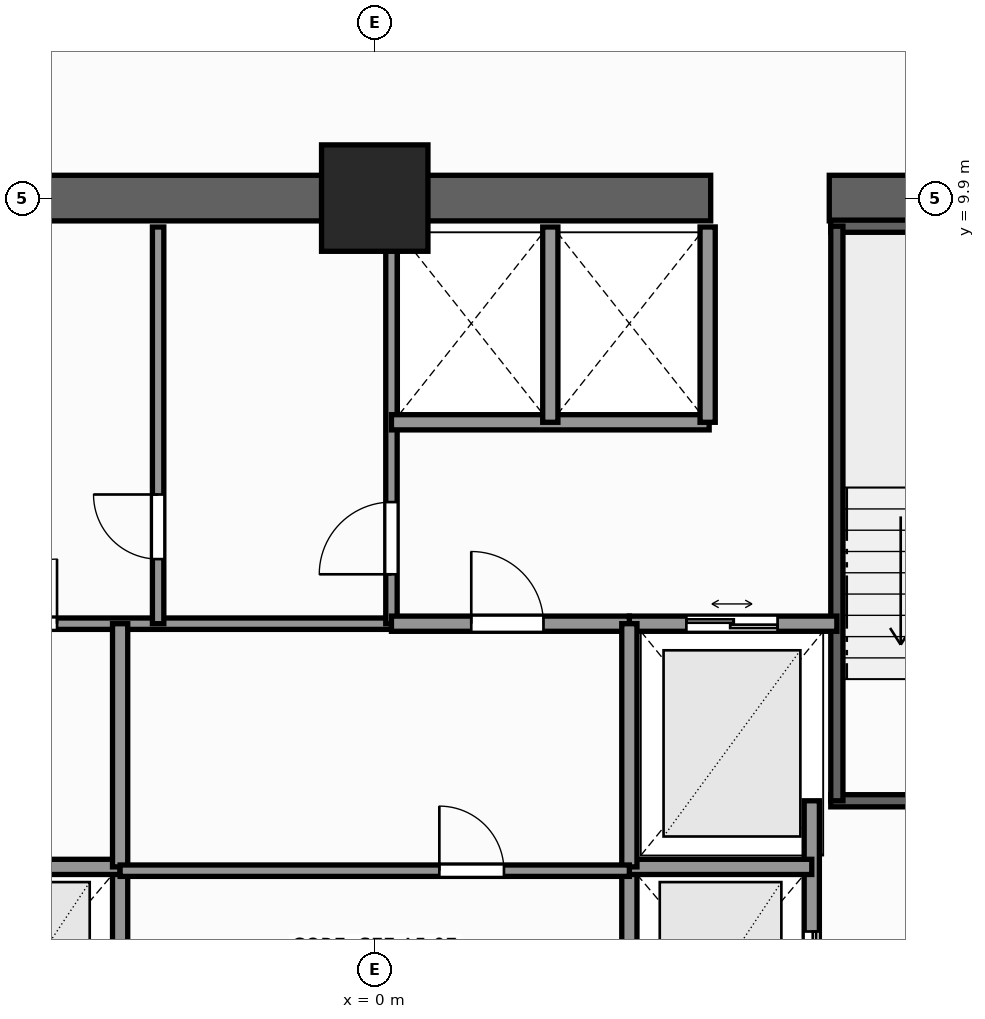
"""IFC4 building model, lengths in metres.
Left out: names, types, materials, properties, quantities, classifications, styles, units other than length and angle.
Written with IfcOpenShell. Run it as: python <this file> out.ifc"""

import sys

from ifc_helpers import new_model, si_unit, direction, frame, frame_2d, origin, origin_2d, place, context, subcontext, project, spatial, rectangle, extrude, element, fill, save


model = new_model("IFC4")
c1 = context("Model", 3, precision=1e-05, world=origin(), true_north=direction((0.0, 1.0)))
c2 = subcontext(c1, "Body", "Model", "MODEL_VIEW")
j1 = project(units=[si_unit("LENGTHUNIT", "METRE"), si_unit("PLANEANGLEUNIT", "RADIAN")], contexts=[c1])
p1 = place(None, origin())
s1 = spatial("IfcSite", under=j1, at=p1, CompositionType="ELEMENT")
p2 = place(p1, origin())
s2 = spatial("IfcBuilding", under=s1, at=p2, CompositionType="ELEMENT")
p3 = place(p2, frame((0.0, 0.0, 88.7)))
s3 = spatial("IfcBuildingStorey", under=s2, at=p3, CompositionType="ELEMENT", Elevation=88.7)
p4 = place(p3, frame((-10.2, 9.9, 0.0), z_axis=(0.0, 0.0, 1.0), x_axis=(1.0, 0.0, 0.0)))
e1 = element("IfcWall", 1, at=p4, inside=s3, PredefinedType="SHEAR", context=c2, shape_type="SweptSolid", body=[
    extrude(rectangle(XDim=14.62, YDim=0.6, at=frame_2d((7.31, 0.0))), origin(), (0.0, 0.0, 1.0), 3.3),
])
p5 = place(p3, frame((5.98, 9.9, 0.0), z_axis=(0.0, 0.0, 1.0), x_axis=(1.0, 0.0, 0.0)))
e2 = element("IfcWall", 2, at=p5, inside=s3, PredefinedType="SHEAR", context=c2, shape_type="SweptSolid", body=[
    extrude(rectangle(XDim=4.22, YDim=0.6, at=frame_2d((2.11, 0.0))), origin(), (0.0, 0.0, 1.0), 3.3),
])
p6 = place(p3, frame((0.0, 9.9, 0.0), z_axis=(0.0, 0.0, 1.0), x_axis=(1.0, 0.0, 0.0)))
e3 = element("IfcColumn", 3, at=p6, inside=s3, PredefinedType="COLUMN", context=c2, shape_type="SweptSolid", body=[
    extrude(rectangle(XDim=1.4, YDim=1.4, at=origin_2d()), origin(), (0.0, 0.0, 1.0), 3.3),
])
p7 = place(p3, frame((6.0, 1.97, 0.0), z_axis=(0.0, 0.0, 1.0), x_axis=(1.0, 0.0, 0.0)))
e4 = element("IfcWall", 4, at=p7, inside=s3, PredefinedType="SHEAR", context=c2, shape_type="SweptSolid", body=[
    extrude(rectangle(XDim=3.52, YDim=0.16, at=frame_2d((1.76, 0.0))), origin(), (0.0, 0.0, 1.0), 3.3),
])
p8 = place(p7, frame((1.15, 0.0, 0.0)))
e5 = element("IfcOpeningElement", 5, at=p8, cuts=e4, PredefinedType="OPENING", context=c2, shape_type="SweptSolid", body=[
    extrude(rectangle(XDim=1.1, YDim=2.2, at=frame_2d((0.55, 1.1))), frame((0.0, 0.09, 0.0), z_axis=(0.0, -1.0, 0.0), x_axis=(1.0, 0.0, 0.0)), (0.0, 0.0, 1.0), 0.18),
])
p9 = place(p3, frame((6.0, 9.53, 0.0), z_axis=(0.0, 0.0, 1.0), x_axis=(1.0, 0.0, 0.0)))
e6 = element("IfcWall", 6, at=p9, inside=s3, PredefinedType="SHEAR", context=c2, shape_type="SweptSolid", body=[
    extrude(rectangle(XDim=3.52, YDim=0.16, at=frame_2d((1.76, 0.0))), origin(), (0.0, 0.0, 1.0), 3.3),
])
p10 = place(p3, frame((6.08, 1.97, 0.0), z_axis=(0.0, 0.0, 1.0), x_axis=(0.0, 1.0, 0.0)))
e7 = element("IfcWall", 7, at=p10, inside=s3, PredefinedType="SHEAR", context=c2, shape_type="SweptSolid", body=[
    extrude(rectangle(XDim=7.56, YDim=0.16, at=frame_2d((3.78, 0.0))), origin(), (0.0, 0.0, 1.0), 3.3),
])
p11 = place(p3, frame((-3.35, -1.7, 0.0), z_axis=(0.0, 0.0, 1.0), x_axis=(0.0, 1.0, 0.0)))
e8 = element("IfcWall", 8, at=p11, inside=s3, PredefinedType="SOLIDWALL", context=c2, shape_type="SweptSolid", body=[
    extrude(rectangle(XDim=2.8, YDim=0.2, at=frame_2d((1.4, 0.0))), origin(), (0.0, 0.0, 1.0), 3.08),
])
p12 = place(p3, frame((-5.75, 1.1, 0.0), z_axis=(0.0, 0.0, 1.0), x_axis=(1.0, 0.0, 0.0)))
e9 = element("IfcWall", 9, at=p12, inside=s3, PredefinedType="SOLIDWALL", context=c2, shape_type="SweptSolid", body=[
    extrude(rectangle(XDim=2.4, YDim=0.2, at=frame_2d((1.2, 0.0))), origin(), (0.0, 0.0, 1.0), 3.08),
])
p13 = place(p3, frame((5.75, -3.6, 0.0), z_axis=(0.0, 0.0, 1.0), x_axis=(0.0, 1.0, 0.0)))
e10 = element("IfcWall", 10, at=p13, inside=s3, PredefinedType="SOLIDWALL", context=c2, shape_type="SweptSolid", body=[
    extrude(rectangle(XDim=5.57, YDim=0.2, at=frame_2d((2.785, 0.0))), origin(), (0.0, 0.0, 1.0), 3.08),
])
p14 = place(p13, frame((2.75, 0.0, 0.0)))
e11 = element("IfcOpeningElement", 11, at=p14, cuts=e10, PredefinedType="OPENING", context=c2, shape_type="SweptSolid", body=[
    extrude(rectangle(XDim=1.1, YDim=2.2, at=frame_2d((0.55, 1.1))), frame((0.0, 0.11, 0.0), z_axis=(0.0, -1.0, 0.0), x_axis=(1.0, 0.0, 0.0)), (0.0, 0.0, 1.0), 0.22),
])
p15 = place(p3, frame((3.35, -1.7, 0.0), z_axis=(0.0, 0.0, 1.0), x_axis=(0.0, 1.0, 0.0)))
e12 = element("IfcWall", 12, at=p15, inside=s3, PredefinedType="SOLIDWALL", context=c2, shape_type="SweptSolid", body=[
    extrude(rectangle(XDim=2.8, YDim=0.2, at=frame_2d((1.4, 0.0))), origin(), (0.0, 0.0, 1.0), 3.08),
])
p16 = place(p3, frame((3.35, 1.1, 0.0), z_axis=(0.0, 0.0, 1.0), x_axis=(1.0, 0.0, 0.0)))
e13 = element("IfcWall", 13, at=p16, inside=s3, PredefinedType="SOLIDWALL", context=c2, shape_type="SweptSolid", body=[
    extrude(rectangle(XDim=2.4, YDim=0.2, at=frame_2d((1.2, 0.0))), origin(), (0.0, 0.0, 1.0), 3.08),
])
p17 = place(p3, frame((3.35, 4.3, 0.0), z_axis=(0.0, 0.0, 1.0), x_axis=(1.0, 0.0, 0.0)))
e14 = element("IfcWall", 14, at=p17, inside=s3, PredefinedType="SOLIDWALL", context=c2, shape_type="SweptSolid", body=[
    extrude(rectangle(XDim=2.73, YDim=0.2, at=frame_2d((1.365, 0.0))), origin(), (0.0, 0.0, 1.0), 3.08),
])
p18 = place(p17, frame((0.75, 0.0, 0.0)))
e15 = element("IfcOpeningElement", 15, at=p18, cuts=e14, PredefinedType="OPENING", context=c2, shape_type="SweptSolid", body=[
    extrude(rectangle(XDim=1.2, YDim=2.25, at=frame_2d((0.6, 1.125))), frame((0.0, 0.11, 0.0), z_axis=(0.0, -1.0, 0.0), x_axis=(1.0, 0.0, 0.0)), (0.0, 0.0, 1.0), 0.22),
])
p19 = place(p3, frame((-6.08, 4.3, 0.0), z_axis=(0.0, 0.0, 1.0), x_axis=(1.0, 0.0, 0.0)))
e16 = element("IfcWall", 16, at=p19, inside=s3, PredefinedType="PARTITIONING", context=c2, shape_type="SweptSolid", body=[
    extrude(rectangle(XDim=6.3, YDim=0.15, at=frame_2d((3.15, 0.0))), origin(), (0.0, 0.0, 1.0), 3.08),
])
p20 = place(p19, frame((1.05, 0.0, 0.0)))
e17 = element("IfcOpeningElement", 17, at=p20, cuts=e16, PredefinedType="OPENING", context=c2, shape_type="SweptSolid", body=[
    extrude(rectangle(XDim=0.85, YDim=2.03, at=frame_2d((0.425, 1.015))), frame((0.0, 0.085, 0.0), z_axis=(0.0, -1.0, 0.0), x_axis=(1.0, 0.0, 0.0)), (0.0, 0.0, 1.0), 0.17),
])
p21 = place(p3, frame((0.22, 4.3, 0.0), z_axis=(0.0, 0.0, 1.0), x_axis=(0.0, 1.0, 0.0)))
e18 = element("IfcWall", 18, at=p21, inside=s3, PredefinedType="PARTITIONING", context=c2, shape_type="SweptSolid", body=[
    extrude(rectangle(XDim=5.22, YDim=0.15, at=frame_2d((2.61, 0.0))), origin(), (0.0, 0.0, 1.0), 3.08),
])
p22 = place(p21, frame((0.65, 0.0, 0.0)))
e19 = element("IfcOpeningElement", 19, at=p22, cuts=e18, PredefinedType="OPENING", context=c2, shape_type="SweptSolid", body=[
    extrude(rectangle(XDim=0.95, YDim=2.06, at=frame_2d((0.475, 1.03))), frame((0.0, 0.085, 0.0), z_axis=(0.0, -1.0, 0.0), x_axis=(1.0, 0.0, 0.0)), (0.0, 0.0, 1.0), 0.17),
])
p23 = place(p3, frame((-2.85, 4.3, 0.0), z_axis=(0.0, 0.0, 1.0), x_axis=(0.0, 1.0, 0.0)))
e20 = element("IfcWall", 20, at=p23, inside=s3, PredefinedType="PARTITIONING", context=c2, shape_type="SweptSolid", body=[
    extrude(rectangle(XDim=5.22, YDim=0.15, at=frame_2d((2.61, 0.0))), origin(), (0.0, 0.0, 1.0), 3.08),
])
p24 = place(p23, frame((0.85, 0.0, 0.0)))
e21 = element("IfcOpeningElement", 21, at=p24, cuts=e20, PredefinedType="OPENING", context=c2, shape_type="SweptSolid", body=[
    extrude(rectangle(XDim=0.85, YDim=2.03, at=frame_2d((0.425, 1.015))), frame((0.0, 0.085, 0.0), z_axis=(0.0, -1.0, 0.0), x_axis=(1.0, 0.0, 0.0)), (0.0, 0.0, 1.0), 0.17),
])
p25 = place(p3, frame((0.22, 6.95, 0.0), z_axis=(0.0, 0.0, 1.0), x_axis=(1.0, 0.0, 0.0)))
e22 = element("IfcWall", 22, at=p25, inside=s3, PredefinedType="SOLIDWALL", context=c2, shape_type="SweptSolid", body=[
    extrude(rectangle(XDim=4.18, YDim=0.2, at=frame_2d((2.09, 0.0))), origin(), (0.0, 0.0, 1.0), 3.08),
])
for number, where, z_axis, x_axis in (
    (23, (4.38, 6.95, 0.0), (0.0, 0.0, 1.0), (0.0, 1.0, 0.0)),
    (24, (2.31, 6.95, 0.0), (0.0, 0.0, 1.0), (0.0, 1.0, 0.0)),
):
    element("IfcWall", number, at=place(p3, frame(where, z_axis=z_axis, x_axis=x_axis)), inside=s3, PredefinedType="SOLIDWALL", context=c2, shape_type="SweptSolid", body=[
        extrude(rectangle(XDim=2.57, YDim=0.2, at=frame_2d((1.285, 0.0))), origin(), (0.0, 0.0, 1.0), 3.08),
    ])
p26 = place(p3, frame((0.22, 4.3, 0.0), z_axis=(0.0, 0.0, 1.0), x_axis=(1.0, 0.0, 0.0)))
e25 = element("IfcWall", 25, at=p26, inside=s3, PredefinedType="SOLIDWALL", context=c2, shape_type="SweptSolid", body=[
    extrude(rectangle(XDim=3.13, YDim=0.2, at=frame_2d((1.565, 0.0))), origin(), (0.0, 0.0, 1.0), 3.08),
])
p27 = place(p26, frame((1.05, 0.0, 0.0)))
e26 = element("IfcOpeningElement", 26, at=p27, cuts=e25, PredefinedType="OPENING", context=c2, shape_type="SweptSolid", body=[
    extrude(rectangle(XDim=0.95, YDim=2.06, at=frame_2d((0.475, 1.03))), frame((0.0, 0.11, 0.0), z_axis=(0.0, -1.0, 0.0), x_axis=(1.0, 0.0, 0.0)), (0.0, 0.0, 1.0), 0.22),
])
for number, where, z_axis, x_axis in (
    (27, (-3.35, 1.1, 0.0), (0.0, 0.0, 1.0), (0.0, 1.0, 0.0)),
    (28, (3.35, 1.1, 0.0), (0.0, 0.0, 1.0), (0.0, 1.0, 0.0)),
):
    element("IfcWall", number, at=place(p3, frame(where, z_axis=z_axis, x_axis=x_axis)), inside=s3, PredefinedType="SOLIDWALL", context=c2, shape_type="SweptSolid", body=[
        extrude(rectangle(XDim=3.2, YDim=0.2, at=frame_2d((1.6, 0.0))), origin(), (0.0, 0.0, 1.0), 3.08),
    ])
p28 = place(p3, frame((-3.35, 1.05, 0.0), z_axis=(0.0, 0.0, 1.0), x_axis=(1.0, 0.0, 0.0)))
e29 = element("IfcWall", 29, at=p28, inside=s3, PredefinedType="PARTITIONING", context=c2, shape_type="SweptSolid", body=[
    extrude(rectangle(XDim=6.7, YDim=0.15, at=frame_2d((3.35, 0.0))), origin(), (0.0, 0.0, 1.0), 3.08),
])
p29 = place(p28, frame((4.2, 0.0, 0.0)))
e30 = element("IfcOpeningElement", 30, at=p29, cuts=e29, PredefinedType="OPENING", context=c2, shape_type="SweptSolid", body=[
    extrude(rectangle(XDim=0.85, YDim=2.03, at=frame_2d((0.425, 1.015))), frame((0.0, 0.085, 0.0), z_axis=(0.0, -1.0, 0.0), x_axis=(1.0, 0.0, 0.0)), (0.0, 0.0, 1.0), 0.17),
])
p30 = place(p14, origin())
e31 = element("IfcDoor", 31, at=p30, inside=s3, OperationType="DOUBLE_DOOR_SLIDING", PredefinedType="DOOR", context=c2, shape_type="SweptSolid", body=[
    extrude(rectangle(XDim=1.1, YDim=2.2, at=frame_2d((0.55, 1.1))), frame((0.0, 0.025, 0.0), z_axis=(0.0, -1.0, 0.0), x_axis=(1.0, 0.0, 0.0)), (0.0, 0.0, 1.0), 0.05),
])
fill(e11, e31)
p31 = place(p18, origin())
e32 = element("IfcDoor", 32, at=p31, inside=s3, OperationType="DOUBLE_DOOR_SLIDING", PredefinedType="DOOR", context=c2, shape_type="SweptSolid", body=[
    extrude(rectangle(XDim=1.2, YDim=2.25, at=frame_2d((0.6, 1.125))), frame((0.0, 0.025, 0.0), z_axis=(0.0, -1.0, 0.0), x_axis=(1.0, 0.0, 0.0)), (0.0, 0.0, 1.0), 0.05),
])
fill(e15, e32)
p32 = place(p22, origin())
e33 = element("IfcDoor", 33, at=p32, inside=s3, OperationType="SINGLE_SWING_LEFT", PredefinedType="DOOR", context=c2, shape_type="SweptSolid", body=[
    extrude(rectangle(XDim=0.95, YDim=2.06, at=frame_2d((0.475, 1.03))), frame((0.0, 0.025, 0.0), z_axis=(0.0, -1.0, 0.0), x_axis=(1.0, 0.0, 0.0)), (0.0, 0.0, 1.0), 0.05),
])
fill(e19, e33)
p33 = place(p24, origin())
e34 = element("IfcDoor", 34, at=p33, inside=s3, OperationType="SINGLE_SWING_RIGHT", PredefinedType="DOOR", context=c2, shape_type="SweptSolid", body=[
    extrude(rectangle(XDim=0.85, YDim=2.03, at=frame_2d((0.425, 1.015))), frame((0.0, 0.025, 0.0), z_axis=(0.0, -1.0, 0.0), x_axis=(1.0, 0.0, 0.0)), (0.0, 0.0, 1.0), 0.05),
])
fill(e21, e34)
p34 = place(p27, origin())
e35 = element("IfcDoor", 35, at=p34, inside=s3, OperationType="SINGLE_SWING_LEFT", PredefinedType="DOOR", context=c2, shape_type="SweptSolid", body=[
    extrude(rectangle(XDim=0.95, YDim=2.06, at=frame_2d((0.475, 1.03))), frame((0.0, 0.025, 0.0), z_axis=(0.0, -1.0, 0.0), x_axis=(1.0, 0.0, 0.0)), (0.0, 0.0, 1.0), 0.05),
])
fill(e26, e35)
p35 = place(p29, origin())
e36 = element("IfcDoor", 36, at=p35, inside=s3, OperationType="SINGLE_SWING_LEFT", PredefinedType="DOOR", context=c2, shape_type="SweptSolid", body=[
    extrude(rectangle(XDim=0.85, YDim=2.03, at=frame_2d((0.425, 1.015))), frame((0.0, 0.025, 0.0), z_axis=(0.0, -1.0, 0.0), x_axis=(1.0, 0.0, 0.0)), (0.0, 0.0, 1.0), 0.05),
])
fill(e30, e36)
p36 = place(p20, origin())
e37 = element("IfcDoor", 37, at=p36, inside=s3, OperationType="SINGLE_SWING_RIGHT", PredefinedType="DOOR", context=c2, shape_type="SweptSolid", body=[
    extrude(rectangle(XDim=0.85, YDim=2.03, at=frame_2d((0.425, 1.015))), frame((0.0, 0.025, 0.0), z_axis=(0.0, -1.0, 0.0), x_axis=(1.0, 0.0, 0.0)), (0.0, 0.0, 1.0), 0.05),
])
fill(e17, e37)
save(model, sys.argv[1])
